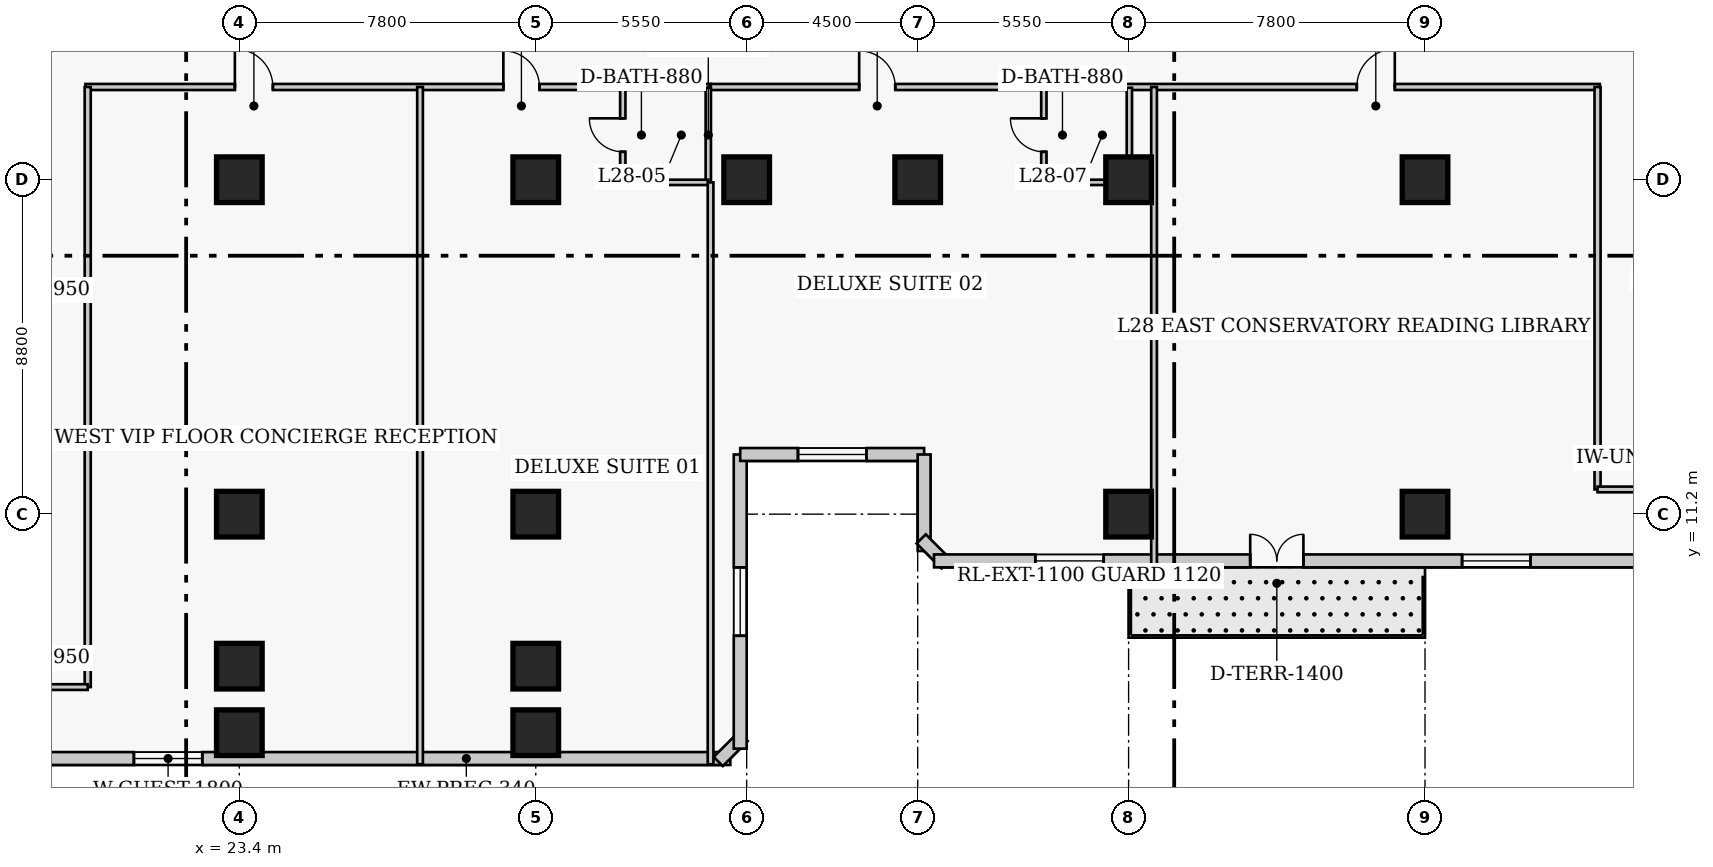
"""IFC4 building model, lengths in metres.
Left out: names, types, materials, properties, quantities, classifications, styles, units other than length and angle.
Written with IfcOpenShell. Run it as: python <this file> out.ifc"""

import sys

from ifc_helpers import new_model, si_unit, direction, frame, frame_2d, origin, origin_2d, place, context, subcontext, project, spatial, rectangle, extrude, element, fill, save


model = new_model("IFC4")
c1 = context("Model", 3, precision=1e-05, world=origin(), true_north=direction((0.0, 1.0)))
c2 = subcontext(c1, "Body", "Model", "MODEL_VIEW")
j1 = project(units=[si_unit("LENGTHUNIT", "METRE"), si_unit("PLANEANGLEUNIT", "RADIAN")], contexts=[c1])
p1 = place(None, origin())
s1 = spatial("IfcSite", under=j1, at=p1, CompositionType="ELEMENT")
p2 = place(p1, origin())
s2 = spatial("IfcBuilding", under=s1, at=p2, CompositionType="ELEMENT")
p3 = place(p2, frame((0.0, 0.0, 114.6)))
s3 = spatial("IfcBuildingStorey", under=s2, at=p3, CompositionType="ELEMENT", Elevation=114.6)
for number, where, z_axis, x_axis in (
    (1, (23.4, 11.2, 0.0), (0.0, 0.0, 1.0), (1.0, 0.0, 0.0)),
    (2, (23.4, 20.0, 0.0), (0.0, 0.0, 1.0), (1.0, 0.0, 0.0)),
    (3, (31.2, 11.2, 0.0), (0.0, 0.0, 1.0), (1.0, 0.0, 0.0)),
    (4, (31.2, 20.0, 0.0), (0.0, 0.0, 1.0), (1.0, 0.0, 0.0)),
    (5, (36.75, 20.0, 0.0), (0.0, 0.0, 1.0), (1.0, 0.0, 0.0)),
    (6, (41.25, 20.0, 0.0), (0.0, 0.0, 1.0), (1.0, 0.0, 0.0)),
    (7, (46.8, 11.2, 0.0), (0.0, 0.0, 1.0), (1.0, 0.0, 0.0)),
    (8, (46.8, 20.0, 0.0), (0.0, 0.0, 1.0), (1.0, 0.0, 0.0)),
    (9, (54.6, 11.2, 0.0), (0.0, 0.0, 1.0), (1.0, 0.0, 0.0)),
    (10, (54.6, 20.0, 0.0), (0.0, 0.0, 1.0), (1.0, 0.0, 0.0)),
    (11, (23.4, 7.2, 0.0), (0.0, 0.0, 1.0), (1.0, 0.0, 0.0)),
    (12, (31.2, 7.2, 0.0), (0.0, 0.0, 1.0), (1.0, 0.0, 0.0)),
    (13, (23.4, 5.45, 0.0), (0.0, 0.0, 1.0), (1.0, 0.0, 0.0)),
    (14, (31.2, 5.45, 0.0), (0.0, 0.0, 1.0), (1.0, 0.0, 0.0)),
):
    element("IfcColumn", number, at=place(p3, frame(where, z_axis=z_axis, x_axis=x_axis)), inside=s3, PredefinedType="COLUMN", context=c2, shape_type="SweptSolid", body=[
        extrude(rectangle(XDim=1.2, YDim=1.2, at=origin_2d()), origin(), (0.0, 0.0, 1.0), 3.8),
    ])
p4 = place(p3, frame((8.03, 4.77, 0.0), z_axis=(0.0, 0.0, 1.0), x_axis=(1.0, 0.0, 0.0)))
e15 = element("IfcWall", 15, at=p4, inside=s3, PredefinedType="SOLIDWALL", context=c2, shape_type="SweptSolid", body=[
    extrude(rectangle(XDim=28.29, YDim=0.34, at=frame_2d((14.145, 0.0))), origin(), (0.0, 0.0, 1.0), 3.54),
])
p5 = place(p4, frame((12.595, 0.0, 0.85)))
e16 = element("IfcOpeningElement", 16, at=p5, cuts=e15, PredefinedType="OPENING", context=c2, shape_type="SweptSolid", body=[
    extrude(rectangle(XDim=1.8, YDim=1.8, at=frame_2d((0.9, 0.9))), frame((0.0, 0.18, 0.0), z_axis=(0.0, -1.0, 0.0), x_axis=(1.0, 0.0, 0.0)), (0.0, 0.0, 1.0), 0.36),
])
p6 = place(p3, frame((36.001, 4.692, 0.0), z_axis=(0.0, 0.0, 1.0), x_axis=(0.707238225886, 0.706975312048, 0.0)))
e17 = element("IfcWall", 17, at=p6, inside=s3, PredefinedType="SOLIDWALL", context=c2, shape_type="SweptSolid", body=[
    extrude(rectangle(XDim=0.929, YDim=0.34, at=frame_2d((0.464, 0.0))), origin(), (0.0, 0.0, 1.0), 3.54),
])
p7 = place(p3, frame((36.58, 5.03, 0.0), z_axis=(0.0, 0.0, 1.0), x_axis=(0.0, 1.0, 0.0)))
e18 = element("IfcWall", 18, at=p7, inside=s3, PredefinedType="SOLIDWALL", context=c2, shape_type="SweptSolid", body=[
    extrude(rectangle(XDim=7.74, YDim=0.34, at=frame_2d((3.87, 0.0))), origin(), (0.0, 0.0, 1.0), 3.54),
])
p8 = place(p7, frame((2.97, 0.0, 0.85)))
e19 = element("IfcOpeningElement", 19, at=p8, cuts=e18, PredefinedType="OPENING", context=c2, shape_type="SweptSolid", body=[
    extrude(rectangle(XDim=1.8, YDim=1.8, at=frame_2d((0.9, 0.9))), frame((0.0, 0.18, 0.0), z_axis=(0.0, -1.0, 0.0), x_axis=(1.0, 0.0, 0.0)), (0.0, 0.0, 1.0), 0.36),
])
p9 = place(p3, frame((36.58, 12.77, 0.0), z_axis=(0.0, 0.0, 1.0), x_axis=(1.0, 0.0, 0.0)))
e20 = element("IfcWall", 20, at=p9, inside=s3, PredefinedType="SOLIDWALL", context=c2, shape_type="SweptSolid", body=[
    extrude(rectangle(XDim=4.84, YDim=0.34, at=frame_2d((2.42, 0.0))), origin(), (0.0, 0.0, 1.0), 3.54),
])
p10 = place(p9, frame((1.52, 0.0, 0.85)))
e21 = element("IfcOpeningElement", 21, at=p10, cuts=e20, PredefinedType="OPENING", context=c2, shape_type="SweptSolid", body=[
    extrude(rectangle(XDim=1.8, YDim=1.8, at=frame_2d((0.9, 0.9))), frame((0.0, 0.18, 0.0), z_axis=(0.0, -1.0, 0.0), x_axis=(1.0, 0.0, 0.0)), (0.0, 0.0, 1.0), 0.36),
])
p11 = place(p3, frame((41.42, 12.77, 0.0), z_axis=(0.0, 0.0, 1.0), x_axis=(0.0, -1.0, 0.0)))
e22 = element("IfcWall", 22, at=p11, inside=s3, PredefinedType="SOLIDWALL", context=c2, shape_type="SweptSolid", body=[
    extrude(rectangle(XDim=2.54, YDim=0.34, at=frame_2d((1.27, 0.0))), origin(), (0.0, 0.0, 1.0), 3.54),
])
p12 = place(p3, frame((41.342, 10.549, 0.0), z_axis=(0.0, 0.0, 1.0), x_axis=(0.707106781187, -0.707106781187, 0.0)))
e23 = element("IfcWall", 23, at=p12, inside=s3, PredefinedType="SOLIDWALL", context=c2, shape_type="SweptSolid", body=[
    extrude(rectangle(XDim=0.929, YDim=0.34, at=frame_2d((0.464, 0.0))), origin(), (0.0, 0.0, 1.0), 3.54),
])
p13 = place(p3, frame((41.68, 9.97, 0.0), z_axis=(0.0, 0.0, 1.0), x_axis=(1.0, 0.0, 0.0)))
e24 = element("IfcWall", 24, at=p13, inside=s3, PredefinedType="SOLIDWALL", context=c2, shape_type="SweptSolid", body=[
    extrude(rectangle(XDim=28.29, YDim=0.34, at=frame_2d((14.145, 0.0))), origin(), (0.0, 0.0, 1.0), 3.54),
])
p14 = place(p13, frame((8.32, 0.0, 0.0)))
e25 = element("IfcOpeningElement", 25, at=p14, cuts=e24, PredefinedType="OPENING", context=c2, shape_type="SweptSolid", body=[
    extrude(rectangle(XDim=1.4, YDim=2.15, at=frame_2d((0.7, 1.075))), frame((0.0, 0.18, 0.0), z_axis=(0.0, -1.0, 0.0), x_axis=(1.0, 0.0, 0.0)), (0.0, 0.0, 1.0), 0.36),
])
p15 = place(p13, frame((2.665, 0.0, 0.85)))
e26 = element("IfcOpeningElement", 26, at=p15, cuts=e24, PredefinedType="OPENING", context=c2, shape_type="SweptSolid", body=[
    extrude(rectangle(XDim=1.8, YDim=1.8, at=frame_2d((0.9, 0.9))), frame((0.0, 0.18, 0.0), z_axis=(0.0, -1.0, 0.0), x_axis=(1.0, 0.0, 0.0)), (0.0, 0.0, 1.0), 0.36),
])
p16 = place(p13, frame((13.895, 0.0, 0.85)))
e27 = element("IfcOpeningElement", 27, at=p16, cuts=e24, PredefinedType="OPENING", context=c2, shape_type="SweptSolid", body=[
    extrude(rectangle(XDim=1.8, YDim=1.8, at=frame_2d((0.9, 0.9))), frame((0.0, 0.18, 0.0), z_axis=(0.0, -1.0, 0.0), x_axis=(1.0, 0.0, 0.0)), (0.0, 0.0, 1.0), 0.36),
])
p17 = place(p3, frame((19.35, 22.44, 0.0), z_axis=(0.0, 0.0, 1.0), x_axis=(1.0, 0.0, 0.0)))
e28 = element("IfcWall", 28, at=p17, inside=s3, PredefinedType="PARTITIONING", context=c2, shape_type="SweptSolid", body=[
    extrude(rectangle(XDim=16.45, YDim=0.16, at=frame_2d((8.225, 0.0))), origin(), (0.0, 0.0, 1.0), 3.54),
])
p18 = place(p17, frame((3.933, 0.0, 0.0)))
e29 = element("IfcOpeningElement", 29, at=p18, cuts=e28, PredefinedType="OPENING", context=c2, shape_type="SweptSolid", body=[
    extrude(rectangle(XDim=1.0, YDim=2.15, at=frame_2d((0.5, 1.075))), frame((0.0, 0.09, 0.0), z_axis=(0.0, -1.0, 0.0), x_axis=(1.0, 0.0, 0.0)), (0.0, 0.0, 1.0), 0.18),
])
p19 = place(p17, frame((10.998, 0.0, 0.0)))
e30 = element("IfcOpeningElement", 30, at=p19, cuts=e28, PredefinedType="OPENING", context=c2, shape_type="SweptSolid", body=[
    extrude(rectangle(XDim=0.95, YDim=2.1, at=frame_2d((0.475, 1.05))), frame((0.0, 0.09, 0.0), z_axis=(0.0, -1.0, 0.0), x_axis=(1.0, 0.0, 0.0)), (0.0, 0.0, 1.0), 0.18),
])
p20 = place(p3, frame((35.8, 22.44, 0.0), z_axis=(0.0, 0.0, 1.0), x_axis=(1.0, 0.0, 0.0)))
e31 = element("IfcWall", 31, at=p20, inside=s3, PredefinedType="PARTITIONING", context=c2, shape_type="SweptSolid", body=[
    extrude(rectangle(XDim=23.4, YDim=0.16, at=frame_2d((11.7, 0.0))), origin(), (0.0, 0.0, 1.0), 3.54),
])
p21 = place(p20, frame((3.91, 0.0, 0.0)))
e32 = element("IfcOpeningElement", 32, at=p21, cuts=e31, PredefinedType="OPENING", context=c2, shape_type="SweptSolid", body=[
    extrude(rectangle(XDim=0.95, YDim=2.1, at=frame_2d((0.475, 1.05))), frame((0.0, 0.09, 0.0), z_axis=(0.0, -1.0, 0.0), x_axis=(1.0, 0.0, 0.0)), (0.0, 0.0, 1.0), 0.18),
])
p22 = place(p20, frame((17.005, 0.0, 0.0)))
e33 = element("IfcOpeningElement", 33, at=p22, cuts=e31, PredefinedType="OPENING", context=c2, shape_type="SweptSolid", body=[
    extrude(rectangle(XDim=1.0, YDim=2.15, at=frame_2d((0.5, 1.075))), frame((0.0, 0.09, 0.0), z_axis=(0.0, -1.0, 0.0), x_axis=(1.0, 0.0, 0.0)), (0.0, 0.0, 1.0), 0.18),
])
p23 = place(p3, frame((19.41, 6.65, 0.0), z_axis=(0.0, 0.0, 1.0), x_axis=(0.0, 1.0, 0.0)))
e34 = element("IfcWall", 34, at=p23, inside=s3, PredefinedType="PARTITIONING", context=c2, shape_type="SweptSolid", body=[
    extrude(rectangle(XDim=15.79, YDim=0.16, at=frame_2d((7.895, 0.0))), origin(), (0.0, 0.0, 1.0), 3.083),
])
p24 = place(p3, frame((59.14, 11.85, 0.0), z_axis=(0.0, 0.0, 1.0), x_axis=(0.0, 1.0, 0.0)))
e35 = element("IfcWall", 35, at=p24, inside=s3, PredefinedType="PARTITIONING", context=c2, shape_type="SweptSolid", body=[
    extrude(rectangle(XDim=10.59, YDim=0.16, at=frame_2d((5.295, 0.0))), origin(), (0.0, 0.0, 1.0), 3.54),
])
p25 = place(p3, frame((59.14, 11.85, 0.0), z_axis=(0.0, 0.0, 1.0), x_axis=(1.0, 0.0, 0.0)))
e36 = element("IfcWall", 36, at=p25, inside=s3, PredefinedType="PARTITIONING", context=c2, shape_type="SweptSolid", body=[
    extrude(rectangle(XDim=2.22, YDim=0.15, at=frame_2d((1.11, 0.0))), origin(), (0.0, 0.0, 1.0), 3.54),
])
p26 = place(p3, frame((17.19, 6.65, 0.0), z_axis=(0.0, 0.0, 1.0), x_axis=(1.0, 0.0, 0.0)))
e37 = element("IfcWall", 37, at=p26, inside=s3, PredefinedType="PARTITIONING", context=c2, shape_type="SweptSolid", body=[
    extrude(rectangle(XDim=2.22, YDim=0.15, at=frame_2d((1.11, 0.0))), origin(), (0.0, 0.0, 1.0), 3.54),
])
p27 = place(p3, frame((28.155, 4.62, 0.0), z_axis=(0.0, 0.0, 1.0), x_axis=(0.0, 1.0, 0.0)))
e38 = element("IfcWall", 38, at=p27, inside=s3, PredefinedType="PARTITIONING", context=c2, shape_type="SweptSolid", body=[
    extrude(rectangle(XDim=17.82, YDim=0.15, at=frame_2d((8.91, 0.0))), origin(), (0.0, 0.0, 1.0), 3.54),
])
p28 = place(p3, frame((33.49, 19.93, 0.0), z_axis=(0.0, 0.0, 1.0), x_axis=(0.0, 1.0, 0.0)))
e39 = element("IfcWall", 39, at=p28, inside=s3, PredefinedType="PLUMBINGWALL", context=c2, shape_type="SweptSolid", body=[
    extrude(rectangle(XDim=2.49, YDim=0.14, at=frame_2d((1.245, 0.0))), origin(), (0.0, 0.0, 1.0), 3.54),
])
p29 = place(p28, frame((0.805, 0.0, 0.0)))
e40 = element("IfcOpeningElement", 40, at=p29, cuts=e39, PredefinedType="OPENING", context=c2, shape_type="SweptSolid", body=[
    extrude(rectangle(XDim=0.88, YDim=2.05, at=frame_2d((0.44, 1.025))), frame((0.0, 0.08, 0.0), z_axis=(0.0, -1.0, 0.0), x_axis=(1.0, 0.0, 0.0)), (0.0, 0.0, 1.0), 0.16),
])
p30 = place(p3, frame((35.74, 19.93, 0.0), z_axis=(0.0, 0.0, 1.0), x_axis=(0.0, 1.0, 0.0)))
e41 = element("IfcWall", 41, at=p30, inside=s3, PredefinedType="PLUMBINGWALL", context=c2, shape_type="SweptSolid", body=[
    extrude(rectangle(XDim=2.49, YDim=0.14, at=frame_2d((1.245, 0.0))), origin(), (0.0, 0.0, 1.0), 3.54),
])
p31 = place(p3, frame((33.49, 19.93, 0.0), z_axis=(0.0, 0.0, 1.0), x_axis=(1.0, 0.0, 0.0)))
e42 = element("IfcWall", 42, at=p31, inside=s3, PredefinedType="PLUMBINGWALL", context=c2, shape_type="SweptSolid", body=[
    extrude(rectangle(XDim=2.25, YDim=0.14, at=frame_2d((1.125, 0.0))), origin(), (0.0, 0.0, 1.0), 2.679),
])
p32 = place(p3, frame((35.8, 4.62, 0.0), z_axis=(0.0, 0.0, 1.0), x_axis=(0.0, 1.0, 0.0)))
e43 = element("IfcWall", 43, at=p32, inside=s3, PredefinedType="PARTITIONING", context=c2, shape_type="SweptSolid", body=[
    extrude(rectangle(XDim=15.31, YDim=0.15, at=frame_2d((7.655, 0.0))), origin(), (0.0, 0.0, 1.0), 3.54),
])
p33 = place(p3, frame((44.57, 19.93, 0.0), z_axis=(0.0, 0.0, 1.0), x_axis=(0.0, 1.0, 0.0)))
e44 = element("IfcWall", 44, at=p33, inside=s3, PredefinedType="PLUMBINGWALL", context=c2, shape_type="SweptSolid", body=[
    extrude(rectangle(XDim=2.49, YDim=0.14, at=frame_2d((1.245, 0.0))), origin(), (0.0, 0.0, 1.0), 3.54),
])
p34 = place(p33, frame((0.805, 0.0, 0.0)))
e45 = element("IfcOpeningElement", 45, at=p34, cuts=e44, PredefinedType="OPENING", context=c2, shape_type="SweptSolid", body=[
    extrude(rectangle(XDim=0.88, YDim=2.05, at=frame_2d((0.44, 1.025))), frame((0.0, 0.08, 0.0), z_axis=(0.0, -1.0, 0.0), x_axis=(1.0, 0.0, 0.0)), (0.0, 0.0, 1.0), 0.16),
])
p35 = place(p3, frame((46.82, 19.93, 0.0), z_axis=(0.0, 0.0, 1.0), x_axis=(0.0, 1.0, 0.0)))
e46 = element("IfcWall", 46, at=p35, inside=s3, PredefinedType="PLUMBINGWALL", context=c2, shape_type="SweptSolid", body=[
    extrude(rectangle(XDim=2.49, YDim=0.14, at=frame_2d((1.245, 0.0))), origin(), (0.0, 0.0, 1.0), 2.679),
])
p36 = place(p3, frame((44.57, 19.93, 0.0), z_axis=(0.0, 0.0, 1.0), x_axis=(1.0, 0.0, 0.0)))
e47 = element("IfcWall", 47, at=p36, inside=s3, PredefinedType="PLUMBINGWALL", context=c2, shape_type="SweptSolid", body=[
    extrude(rectangle(XDim=2.25, YDim=0.14, at=frame_2d((1.125, 0.0))), origin(), (0.0, 0.0, 1.0), 2.679),
])
p37 = place(p3, frame((47.47, 9.82, 0.0), z_axis=(0.0, 0.0, 1.0), x_axis=(0.0, 1.0, 0.0)))
e48 = element("IfcWall", 48, at=p37, inside=s3, PredefinedType="PARTITIONING", context=c2, shape_type="SweptSolid", body=[
    extrude(rectangle(XDim=12.62, YDim=0.15, at=frame_2d((6.31, 0.0))), origin(), (0.0, 0.0, 1.0), 3.54),
])
p38 = place(p5, origin())
e49 = element("IfcWindow", 49, at=p38, inside=s3, PartitioningType="SINGLE_PANEL", PredefinedType="WINDOW", context=c2, shape_type="SweptSolid", body=[
    extrude(rectangle(XDim=1.8, YDim=1.8, at=frame_2d((0.9, 0.9))), frame((0.0, 0.03, 0.0), z_axis=(0.0, -1.0, 0.0), x_axis=(1.0, 0.0, 0.0)), (0.0, 0.0, 1.0), 0.06),
])
fill(e16, e49)
p39 = place(p8, origin())
e50 = element("IfcWindow", 50, at=p39, inside=s3, PartitioningType="SINGLE_PANEL", PredefinedType="WINDOW", context=c2, shape_type="SweptSolid", body=[
    extrude(rectangle(XDim=1.8, YDim=1.8, at=frame_2d((0.9, 0.9))), frame((0.0, 0.03, 0.0), z_axis=(0.0, -1.0, 0.0), x_axis=(1.0, 0.0, 0.0)), (0.0, 0.0, 1.0), 0.06),
])
fill(e19, e50)
p40 = place(p10, origin())
e51 = element("IfcWindow", 51, at=p40, inside=s3, PartitioningType="SINGLE_PANEL", PredefinedType="WINDOW", context=c2, shape_type="SweptSolid", body=[
    extrude(rectangle(XDim=1.8, YDim=1.8, at=frame_2d((0.9, 0.9))), frame((0.0, 0.03, 0.0), z_axis=(0.0, -1.0, 0.0), x_axis=(1.0, 0.0, 0.0)), (0.0, 0.0, 1.0), 0.06),
])
fill(e21, e51)
p41 = place(p14, origin())
e52 = element("IfcDoor", 52, at=p41, inside=s3, OperationType="DOUBLE_DOOR_SINGLE_SWING", PredefinedType="DOOR", context=c2, shape_type="SweptSolid", body=[
    extrude(rectangle(XDim=1.4, YDim=2.15, at=frame_2d((0.7, 1.075))), frame((0.0, 0.025, 0.0), z_axis=(0.0, -1.0, 0.0), x_axis=(1.0, 0.0, 0.0)), (0.0, 0.0, 1.0), 0.05),
])
fill(e25, e52)
p42 = place(p15, origin())
e53 = element("IfcWindow", 53, at=p42, inside=s3, PartitioningType="SINGLE_PANEL", PredefinedType="WINDOW", context=c2, shape_type="SweptSolid", body=[
    extrude(rectangle(XDim=1.8, YDim=1.8, at=frame_2d((0.9, 0.9))), frame((0.0, 0.03, 0.0), z_axis=(0.0, -1.0, 0.0), x_axis=(1.0, 0.0, 0.0)), (0.0, 0.0, 1.0), 0.06),
])
fill(e26, e53)
p43 = place(p16, origin())
e54 = element("IfcWindow", 54, at=p43, inside=s3, PartitioningType="SINGLE_PANEL", PredefinedType="WINDOW", context=c2, shape_type="SweptSolid", body=[
    extrude(rectangle(XDim=1.8, YDim=1.8, at=frame_2d((0.9, 0.9))), frame((0.0, 0.03, 0.0), z_axis=(0.0, -1.0, 0.0), x_axis=(1.0, 0.0, 0.0)), (0.0, 0.0, 1.0), 0.06),
])
fill(e27, e54)
p44 = place(p18, origin())
e55 = element("IfcDoor", 55, at=p44, inside=s3, OperationType="SINGLE_SWING_LEFT", PredefinedType="DOOR", context=c2, shape_type="SweptSolid", body=[
    extrude(rectangle(XDim=1.0, YDim=2.15, at=frame_2d((0.5, 1.075))), frame((0.0, 0.025, 0.0), z_axis=(0.0, -1.0, 0.0), x_axis=(1.0, 0.0, 0.0)), (0.0, 0.0, 1.0), 0.05),
])
fill(e29, e55)
p45 = place(p29, origin())
e56 = element("IfcDoor", 56, at=p45, inside=s3, OperationType="SINGLE_SWING_RIGHT", PredefinedType="DOOR", context=c2, shape_type="SweptSolid", body=[
    extrude(rectangle(XDim=0.88, YDim=2.05, at=frame_2d((0.44, 1.025))), frame((0.0, 0.025, 0.0), z_axis=(0.0, -1.0, 0.0), x_axis=(1.0, 0.0, 0.0)), (0.0, 0.0, 1.0), 0.05),
])
fill(e40, e56)
p46 = place(p19, origin())
e57 = element("IfcDoor", 57, at=p46, inside=s3, OperationType="SINGLE_SWING_LEFT", PredefinedType="DOOR", context=c2, shape_type="SweptSolid", body=[
    extrude(rectangle(XDim=0.95, YDim=2.1, at=frame_2d((0.475, 1.05))), frame((0.0, 0.025, 0.0), z_axis=(0.0, -1.0, 0.0), x_axis=(1.0, 0.0, 0.0)), (0.0, 0.0, 1.0), 0.05),
])
fill(e30, e57)
p47 = place(p34, origin())
e58 = element("IfcDoor", 58, at=p47, inside=s3, OperationType="SINGLE_SWING_RIGHT", PredefinedType="DOOR", context=c2, shape_type="SweptSolid", body=[
    extrude(rectangle(XDim=0.88, YDim=2.05, at=frame_2d((0.44, 1.025))), frame((0.0, 0.025, 0.0), z_axis=(0.0, -1.0, 0.0), x_axis=(1.0, 0.0, 0.0)), (0.0, 0.0, 1.0), 0.05),
])
fill(e45, e58)
p48 = place(p21, origin())
e59 = element("IfcDoor", 59, at=p48, inside=s3, OperationType="SINGLE_SWING_LEFT", PredefinedType="DOOR", context=c2, shape_type="SweptSolid", body=[
    extrude(rectangle(XDim=0.95, YDim=2.1, at=frame_2d((0.475, 1.05))), frame((0.0, 0.025, 0.0), z_axis=(0.0, -1.0, 0.0), x_axis=(1.0, 0.0, 0.0)), (0.0, 0.0, 1.0), 0.05),
])
fill(e32, e59)
p49 = place(p22, origin())
e60 = element("IfcDoor", 60, at=p49, inside=s3, OperationType="SINGLE_SWING_RIGHT", PredefinedType="DOOR", context=c2, shape_type="SweptSolid", body=[
    extrude(rectangle(XDim=1.0, YDim=2.15, at=frame_2d((0.5, 1.075))), frame((0.0, 0.025, 0.0), z_axis=(0.0, -1.0, 0.0), x_axis=(1.0, 0.0, 0.0)), (0.0, 0.0, 1.0), 0.05),
])
fill(e33, e60)
save(model, sys.argv[1])
